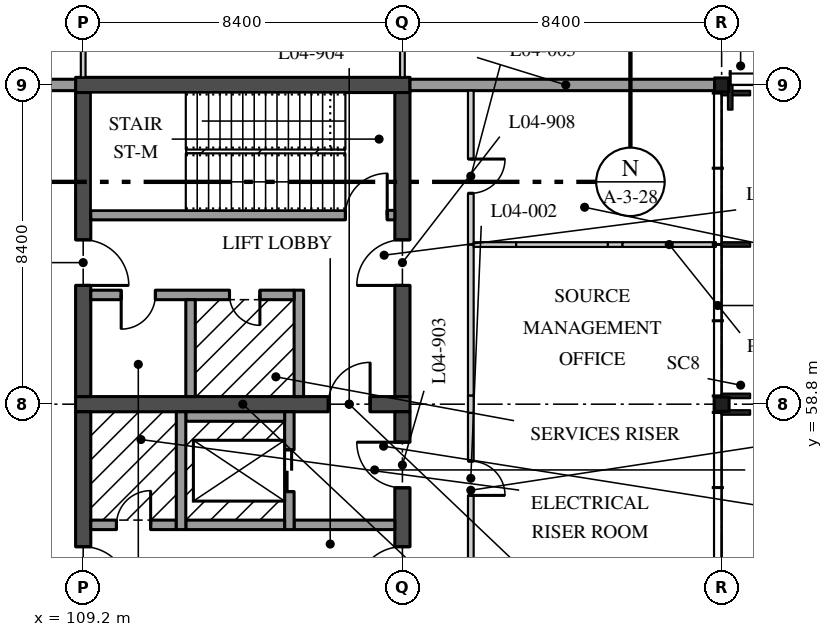
"""IFC4 building model, lengths in metres.
Left out: names, types, materials, properties, quantities, classifications, styles, units other than length and angle.
Written with IfcOpenShell. Run it as: python <this file> out.ifc"""

import sys

from ifc_helpers import new_model, si_unit, direction, frame, frame_2d, origin, origin_2d, place, context, subcontext, project, spatial, rectangle, i_section, extrude, element, fill, save


model = new_model("IFC4")
c1 = context("Model", 3, precision=1e-05, world=origin(), true_north=direction((0.0, 1.0)))
c2 = subcontext(c1, "Body", "Model", "MODEL_VIEW")
j1 = project(units=[si_unit("LENGTHUNIT", "METRE"), si_unit("PLANEANGLEUNIT", "RADIAN")], contexts=[c1])
p1 = place(None, origin())
s1 = spatial("IfcSite", under=j1, at=p1, CompositionType="ELEMENT")
p2 = place(p1, origin())
s2 = spatial("IfcBuilding", under=s1, at=p2, CompositionType="ELEMENT")
p3 = place(p2, frame((0.0, 0.0, 18.9)))
s3 = spatial("IfcBuildingStorey", under=s2, at=p3, CompositionType="ELEMENT", Elevation=18.9)
p4 = place(p3, frame((126.0, 58.8, 0.0), z_axis=(0.0, 0.0, 1.0), x_axis=(1.0, 0.0, 0.0)))
e1 = element("IfcColumn", 1, at=p4, inside=s3, PredefinedType="COLUMN", context=c2, shape_type="SweptSolid", body=[
    extrude(i_section(OverallWidth=0.394, OverallDepth=0.376, WebThickness=0.017, FlangeThickness=0.028, FilletRadius=0.015, at=origin_2d()), origin(), (0.0, 0.0, 1.0), 4.37),
])
p5 = place(p3, frame((126.0, 67.2, 0.0), z_axis=(0.0, 0.0, 1.0), x_axis=(1.0, 0.0, 0.0)))
e2 = element("IfcColumn", 2, at=p5, inside=s3, PredefinedType="COLUMN", context=c2, shape_type="SweptSolid", body=[
    extrude(i_section(OverallWidth=0.373, OverallDepth=0.368, WebThickness=0.015, FlangeThickness=0.024, FilletRadius=0.015, at=origin_2d()), origin(), (0.0, 0.0, 1.0), 4.37),
])
p6 = place(p3, frame((109.0, 58.8, 0.0), z_axis=(0.0, 0.0, 1.0), x_axis=(1.0, 0.0, 0.0)))
e3 = element("IfcWall", 3, at=p6, inside=s3, PredefinedType="SHEAR", context=c2, shape_type="SweptSolid", body=[
    extrude(rectangle(XDim=8.8, YDim=0.4, at=frame_2d((4.4, 0.0))), origin(), (0.0, 0.0, 1.0), 4.37),
])
p7 = place(p6, frame((6.65, 0.0, 0.0)))
e4 = element("IfcOpeningElement", 4, at=p7, cuts=e3, PredefinedType="OPENING", context=c2, shape_type="SweptSolid", body=[
    extrude(rectangle(XDim=1.1, YDim=2.1, at=frame_2d((0.55, 1.05))), frame((0.0, 0.21, 0.0), z_axis=(0.0, -1.0, 0.0), x_axis=(1.0, 0.0, 0.0)), (0.0, 0.0, 1.0), 0.42),
])
p8 = place(p3, frame((109.2, 50.6, 0.0), z_axis=(0.0, 0.0, 1.0), x_axis=(0.0, 1.0, 0.0)))
e5 = element("IfcWall", 5, at=p8, inside=s3, PredefinedType="SHEAR", context=c2, shape_type="SweptSolid", body=[
    extrude(rectangle(XDim=8.0, YDim=0.4, at=frame_2d((4.0, 0.0))), origin(), (0.0, 0.0, 1.0), 4.37),
])
p9 = place(p8, frame((3.25, 0.0, 0.0)))
e6 = element("IfcOpeningElement", 6, at=p9, cuts=e5, PredefinedType="OPENING", context=c2, shape_type="SweptSolid", body=[
    extrude(rectangle(XDim=1.2, YDim=2.1, at=frame_2d((0.6, 1.05))), frame((0.0, 0.21, 0.0), z_axis=(0.0, -1.0, 0.0), x_axis=(1.0, 0.0, 0.0)), (0.0, 0.0, 1.0), 0.42),
])
p10 = place(p3, frame((117.6, 50.6, 0.0), z_axis=(0.0, 0.0, 1.0), x_axis=(0.0, 1.0, 0.0)))
e7 = element("IfcWall", 7, at=p10, inside=s3, PredefinedType="SHEAR", context=c2, shape_type="SweptSolid", body=[
    extrude(rectangle(XDim=8.0, YDim=0.4, at=frame_2d((4.0, 0.0))), origin(), (0.0, 0.0, 1.0), 4.37),
])
p11 = place(p10, frame((3.25, 0.0, 0.0)))
e8 = element("IfcOpeningElement", 8, at=p11, cuts=e7, PredefinedType="OPENING", context=c2, shape_type="SweptSolid", body=[
    extrude(rectangle(XDim=1.2, YDim=2.1, at=frame_2d((0.6, 1.05))), frame((0.0, 0.21, 0.0), z_axis=(0.0, -1.0, 0.0), x_axis=(1.0, 0.0, 0.0)), (0.0, 0.0, 1.0), 0.42),
])
p12 = place(p10, frame((6.0, 0.0, 0.0)))
e9 = element("IfcOpeningElement", 9, at=p12, cuts=e7, PredefinedType="OPENING", context=c2, shape_type="SweptSolid", body=[
    extrude(rectangle(XDim=1.2, YDim=2.1, at=frame_2d((0.6, 1.05))), frame((0.0, 0.21, 0.0), z_axis=(0.0, -1.0, 0.0), x_axis=(1.0, 0.0, 0.0)), (0.0, 0.0, 1.0), 0.42),
])
p13 = place(p3, frame((109.4, 55.625, 0.0), z_axis=(0.0, 0.0, 1.0), x_axis=(1.0, 0.0, 0.0)))
e10 = element("IfcWall", 10, at=p13, inside=s3, PredefinedType="SOLIDWALL", context=c2, shape_type="SweptSolid", body=[
    extrude(rectangle(XDim=2.25, YDim=0.25, at=frame_2d((1.125, 0.0))), origin(), (0.0, 0.0, 1.0), 4.37),
])
p14 = place(p13, frame((0.675, 0.0, 0.0)))
e11 = element("IfcOpeningElement", 11, at=p14, cuts=e10, PredefinedType="OPENING", context=c2, shape_type="SweptSolid", body=[
    extrude(rectangle(XDim=0.9, YDim=2.1, at=frame_2d((0.45, 1.05))), frame((0.0, 0.135, 0.0), z_axis=(0.0, -1.0, 0.0), x_axis=(1.0, 0.0, 0.0)), (0.0, 0.0, 1.0), 0.27),
])
p15 = place(p3, frame((114.75, 55.625, 0.0), z_axis=(0.0, 0.0, 1.0), x_axis=(1.0, 0.0, 0.0)))
e12 = element("IfcWall", 12, at=p15, inside=s3, PredefinedType="SOLIDWALL", context=c2, shape_type="SweptSolid", body=[
    extrude(rectangle(XDim=2.65, YDim=0.25, at=frame_2d((1.325, 0.0))), origin(), (0.0, 0.0, 1.0), 4.37),
])
p16 = place(p3, frame((109.0, 67.2, 0.0), z_axis=(0.0, 0.0, 1.0), x_axis=(1.0, 0.0, 0.0)))
e13 = element("IfcWall", 13, at=p16, inside=s3, PredefinedType="SHEAR", context=c2, shape_type="SweptSolid", body=[
    extrude(rectangle(XDim=8.8, YDim=0.4, at=frame_2d((4.4, 0.0))), origin(), (0.0, 0.0, 1.0), 4.37),
])
p17 = place(p3, frame((109.2, 59.0, 0.0), z_axis=(0.0, 0.0, 1.0), x_axis=(0.0, 1.0, 0.0)))
e14 = element("IfcWall", 14, at=p17, inside=s3, PredefinedType="SHEAR", context=c2, shape_type="SweptSolid", body=[
    extrude(rectangle(XDim=8.0, YDim=0.4, at=frame_2d((4.0, 0.0))), origin(), (0.0, 0.0, 1.0), 4.37),
])
p18 = place(p17, frame((2.925, 0.0, 0.0)))
e15 = element("IfcOpeningElement", 15, at=p18, cuts=e14, PredefinedType="OPENING", context=c2, shape_type="SweptSolid", body=[
    extrude(rectangle(XDim=1.2, YDim=2.1, at=frame_2d((0.6, 1.05))), frame((0.0, 0.21, 0.0), z_axis=(0.0, -1.0, 0.0), x_axis=(1.0, 0.0, 0.0)), (0.0, 0.0, 1.0), 0.42),
])
p19 = place(p3, frame((117.6, 59.0, 0.0), z_axis=(0.0, 0.0, 1.0), x_axis=(0.0, 1.0, 0.0)))
e16 = element("IfcWall", 16, at=p19, inside=s3, PredefinedType="SHEAR", context=c2, shape_type="SweptSolid", body=[
    extrude(rectangle(XDim=8.0, YDim=0.4, at=frame_2d((4.0, 0.0))), origin(), (0.0, 0.0, 1.0), 4.37),
])
p20 = place(p19, frame((2.925, 0.0, 0.0)))
e17 = element("IfcOpeningElement", 17, at=p20, cuts=e16, PredefinedType="OPENING", context=c2, shape_type="SweptSolid", body=[
    extrude(rectangle(XDim=1.2, YDim=2.1, at=frame_2d((0.6, 1.05))), frame((0.0, 0.21, 0.0), z_axis=(0.0, -1.0, 0.0), x_axis=(1.0, 0.0, 0.0)), (0.0, 0.0, 1.0), 0.42),
])
p21 = place(p3, frame((117.4, 63.775, 0.0), z_axis=(0.0, 0.0, 1.0), x_axis=(-1.0, 0.0, 0.0)))
e18 = element("IfcWall", 18, at=p21, inside=s3, PredefinedType="SOLIDWALL", context=c2, shape_type="SweptSolid", body=[
    extrude(rectangle(XDim=8.0, YDim=0.25, at=frame_2d((4.0, 0.0))), origin(), (0.0, 0.0, 1.0), 4.37),
])
p22 = place(p21, frame((0.2, 0.0, 0.0)))
e19 = element("IfcOpeningElement", 19, at=p22, cuts=e18, PredefinedType="OPENING", context=c2, shape_type="SweptSolid", body=[
    extrude(rectangle(XDim=1.1, YDim=2.1, at=frame_2d((0.55, 1.05))), frame((0.0, 0.135, 0.0), z_axis=(0.0, -1.0, 0.0), x_axis=(1.0, 0.0, 0.0)), (0.0, 0.0, 1.0), 0.27),
])
p23 = place(p3, frame((114.875, 61.8, 0.0), z_axis=(0.0, 0.0, 1.0), x_axis=(0.0, -1.0, 0.0)))
e20 = element("IfcWall", 20, at=p23, inside=s3, PredefinedType="SOLIDWALL", context=c2, shape_type="SweptSolid", body=[
    extrude(rectangle(XDim=2.8, YDim=0.25, at=frame_2d((1.4, 0.0))), origin(), (0.0, 0.0, 1.0), 4.37),
])
p24 = place(p3, frame((114.75, 61.675, 0.0), z_axis=(0.0, 0.0, 1.0), x_axis=(-1.0, 0.0, 0.0)))
e21 = element("IfcWall", 21, at=p24, inside=s3, PredefinedType="SOLIDWALL", context=c2, shape_type="SweptSolid", body=[
    extrude(rectangle(XDim=5.35, YDim=0.25, at=frame_2d((2.675, 0.0))), origin(), (0.0, 0.0, 1.0), 4.37),
])
p25 = place(p24, frame((3.65, 0.0, 0.0)))
e22 = element("IfcOpeningElement", 22, at=p25, cuts=e21, PredefinedType="OPENING", context=c2, shape_type="SweptSolid", body=[
    extrude(rectangle(XDim=0.9, YDim=2.1, at=frame_2d((0.45, 1.05))), frame((0.0, 0.135, 0.0), z_axis=(0.0, -1.0, 0.0), x_axis=(1.0, 0.0, 0.0)), (0.0, 0.0, 1.0), 0.27),
])
p26 = place(p24, frame((0.9, 0.0, 0.0)))
e23 = element("IfcOpeningElement", 23, at=p26, cuts=e21, PredefinedType="OPENING", context=c2, shape_type="SweptSolid", body=[
    extrude(rectangle(XDim=0.8, YDim=2.1, at=frame_2d((0.4, 1.05))), frame((0.0, 0.135, 0.0), z_axis=(0.0, -1.0, 0.0), x_axis=(1.0, 0.0, 0.0)), (0.0, 0.0, 1.0), 0.27),
])
p27 = place(p3, frame((112.025, 61.55, 0.0), z_axis=(0.0, 0.0, 1.0), x_axis=(0.0, -1.0, 0.0)))
e24 = element("IfcWall", 24, at=p27, inside=s3, PredefinedType="SOLIDWALL", context=c2, shape_type="SweptSolid", body=[
    extrude(rectangle(XDim=2.55, YDim=0.25, at=frame_2d((1.275, 0.0))), origin(), (0.0, 0.0, 1.0), 4.37),
])
p28 = place(p3, frame((114.625, 55.5, 0.0), z_axis=(0.0, 0.0, 1.0), x_axis=(0.0, 1.0, 0.0)))
e25 = element("IfcWall", 25, at=p28, inside=s3, PredefinedType="SOLIDWALL", context=c2, shape_type="SweptSolid", body=[
    extrude(rectangle(XDim=3.1, YDim=0.25, at=frame_2d((1.55, 0.0))), origin(), (0.0, 0.0, 1.0), 4.37),
])
p29 = place(p28, frame((1.0, 0.0, 0.0)))
e26 = element("IfcOpeningElement", 26, at=p29, cuts=e25, PredefinedType="OPENING", context=c2, shape_type="SweptSolid", body=[
    extrude(rectangle(XDim=1.1, YDim=2.1, at=frame_2d((0.55, 1.05))), frame((0.0, 0.135, 0.0), z_axis=(0.0, -1.0, 0.0), x_axis=(1.0, 0.0, 0.0)), (0.0, 0.0, 1.0), 0.27),
])
for number, where, z_axis, x_axis in (
    (27, (111.9, 58.475, 0.0), (0.0, 0.0, 1.0), (1.0, 0.0, 0.0)),
    (28, (111.9, 55.625, 0.0), (0.0, 0.0, 1.0), (1.0, 0.0, 0.0)),
):
    element("IfcWall", number, at=place(p3, frame(where, z_axis=z_axis, x_axis=x_axis)), inside=s3, PredefinedType="SOLIDWALL", context=c2, shape_type="SweptSolid", body=[
        extrude(rectangle(XDim=2.6, YDim=0.25, at=frame_2d((1.3, 0.0))), origin(), (0.0, 0.0, 1.0), 4.37),
    ])
p30 = place(p3, frame((111.775, 55.5, 0.0), z_axis=(0.0, 0.0, 1.0), x_axis=(0.0, 1.0, 0.0)))
e29 = element("IfcWall", 29, at=p30, inside=s3, PredefinedType="SOLIDWALL", context=c2, shape_type="SweptSolid", body=[
    extrude(rectangle(XDim=3.1, YDim=0.25, at=frame_2d((1.55, 0.0))), origin(), (0.0, 0.0, 1.0), 4.37),
])
p31 = place(p3, frame((119.4, 50.86, 0.0), z_axis=(0.0, 0.0, 1.0), x_axis=(0.0, 1.0, 0.0)))
e30 = element("IfcWall", 30, at=p31, inside=s3, PredefinedType="PARTITIONING", context=c2, shape_type="SweptSolid", body=[
    extrude(rectangle(XDim=7.71, YDim=0.15, at=frame_2d((3.855, 0.0))), origin(), (0.0, 0.0, 1.0), 4.37),
])
p32 = place(p31, frame((5.54, 0.0, 0.0)))
e31 = element("IfcOpeningElement", 31, at=p32, cuts=e30, PredefinedType="OPENING", context=c2, shape_type="SweptSolid", body=[
    extrude(rectangle(XDim=0.9, YDim=2.1, at=frame_2d((0.45, 1.05))), frame((0.0, 0.085, 0.0), z_axis=(0.0, -1.0, 0.0), x_axis=(1.0, 0.0, 0.0)), (0.0, 0.0, 1.0), 0.17),
])
p33 = place(p3, frame((119.4, 58.57, 0.0), z_axis=(0.0, 0.0, 1.0), x_axis=(0.0, 1.0, 0.0)))
e32 = element("IfcWall", 32, at=p33, inside=s3, PredefinedType="PARTITIONING", context=c2, shape_type="SweptSolid", body=[
    extrude(rectangle(XDim=0.46, YDim=0.15, at=frame_2d((0.23, 0.0))), origin(), (0.0, 0.0, 1.0), 3.746),
])
p34 = place(p3, frame((119.4, 59.03, 0.0), z_axis=(0.0, 0.0, 1.0), x_axis=(0.0, 1.0, 0.0)))
e33 = element("IfcWall", 33, at=p34, inside=s3, PredefinedType="PARTITIONING", context=c2, shape_type="SweptSolid", body=[
    extrude(rectangle(XDim=3.97, YDim=0.15, at=frame_2d((1.985, 0.0))), origin(), (0.0, 0.0, 1.0), 4.37),
])
p35 = place(p3, frame((119.4, 63.0, 0.0), z_axis=(0.0, 0.0, 1.0), x_axis=(0.0, 1.0, 0.0)))
e34 = element("IfcWall", 34, at=p35, inside=s3, PredefinedType="PARTITIONING", context=c2, shape_type="SweptSolid", body=[
    extrude(rectangle(XDim=4.05, YDim=0.15, at=frame_2d((2.025, 0.0))), origin(), (0.0, 0.0, 1.0), 4.37),
])
p36 = place(p35, frame((1.35, 0.0, 0.0)))
e35 = element("IfcOpeningElement", 35, at=p36, cuts=e34, PredefinedType="OPENING", context=c2, shape_type="SweptSolid", body=[
    extrude(rectangle(XDim=0.9, YDim=2.1, at=frame_2d((0.45, 1.05))), frame((0.0, 0.085, 0.0), z_axis=(0.0, -1.0, 0.0), x_axis=(1.0, 0.0, 0.0)), (0.0, 0.0, 1.0), 0.17),
])
p37 = place(p3, frame((119.475, 63.0, 0.0), z_axis=(0.0, 0.0, 1.0), x_axis=(1.0, 0.0, 0.0)))
e36 = element("IfcWall", 36, at=p37, inside=s3, PredefinedType="PARTITIONING", context=c2, shape_type="SweptSolid", body=[
    extrude(rectangle(XDim=1.118, YDim=0.125, at=frame_2d((0.559, 0.0))), origin(), (0.0, 0.0, 1.0), 3.895),
])
p38 = place(p3, frame((120.593, 63.0, 0.0), z_axis=(0.0, 0.0, 1.0), x_axis=(1.0, 0.0, 0.0)))
e37 = element("IfcWall", 37, at=p38, inside=s3, PredefinedType="PARTITIONING", context=c2, shape_type="SweptSolid", body=[
    extrude(rectangle(XDim=2.415, YDim=0.125, at=frame_2d((1.208, 0.0))), origin(), (0.0, 0.0, 1.0), 4.37),
])
p39 = place(p3, frame((123.008, 63.0, 0.0), z_axis=(0.0, 0.0, 1.0), x_axis=(1.0, 0.0, 0.0)))
e38 = element("IfcWall", 38, at=p39, inside=s3, PredefinedType="PARTITIONING", context=c2, shape_type="SweptSolid", body=[
    extrude(rectangle(XDim=0.384, YDim=0.125, at=frame_2d((0.192, 0.0))), origin(), (0.0, 0.0, 1.0), 3.895),
])
p40 = place(p3, frame((123.392, 63.0, 0.0), z_axis=(0.0, 0.0, 1.0), x_axis=(1.0, 0.0, 0.0)))
e39 = element("IfcWall", 39, at=p40, inside=s3, PredefinedType="PARTITIONING", context=c2, shape_type="SweptSolid", body=[
    extrude(rectangle(XDim=2.458, YDim=0.125, at=frame_2d((1.229, 0.0))), origin(), (0.0, 0.0, 1.0), 4.37),
])
for number, where, z_axis, x_axis in (
    (40, (109.2, 67.4, 0.0), (0.0, 0.0, 1.0), (0.0, 1.0, 0.0)),
    (41, (117.6, 67.4, 0.0), (0.0, 0.0, 1.0), (0.0, 1.0, 0.0)),
):
    element("IfcWall", number, at=place(p3, frame(where, z_axis=z_axis, x_axis=x_axis)), inside=s3, PredefinedType="PARTITIONING", context=c2, shape_type="SweptSolid", body=[
        extrude(rectangle(XDim=6.625, YDim=0.125, at=frame_2d((3.312, 0.0))), origin(), (0.0, 0.0, 1.0), 3.819),
    ])
for number, where, z_axis, x_axis in (
    (42, (125.997, 67.2, 0.0), (0.0, 0.0, 1.0), (-1.0, 0.0, 0.0)),
    (43, (109.0, 67.2, 0.0), (0.0, 0.0, 1.0), (-1.0, 0.0, 0.0)),
):
    element("IfcWall", number, at=place(p3, frame(where, z_axis=z_axis, x_axis=x_axis)), inside=s3, PredefinedType="SOLIDWALL", context=c2, shape_type="SweptSolid", body=[
        extrude(rectangle(XDim=8.197, YDim=0.3, at=frame_2d((4.099, 0.0))), origin(), (0.0, 0.0, 1.0), 3.746),
    ])
p41 = place(p9, frame((1.2, 0.0, 0.0), z_axis=(0.0, 0.0, 1.0), x_axis=(-1.0, 0.0, 0.0)))
e44 = element("IfcDoor", 44, at=p41, inside=s3, OperationType="SINGLE_SWING_LEFT", PredefinedType="DOOR", context=c2, shape_type="SweptSolid", body=[
    extrude(rectangle(XDim=1.2, YDim=2.1, at=frame_2d((0.6, 1.05))), frame((0.0, 0.035, 0.0), z_axis=(0.0, -1.0, 0.0), x_axis=(1.0, 0.0, 0.0)), (0.0, 0.0, 1.0), 0.07),
])
fill(e6, e44)
p42 = place(p11, origin())
e45 = element("IfcDoor", 45, at=p42, inside=s3, OperationType="SINGLE_SWING_RIGHT", PredefinedType="DOOR", context=c2, shape_type="SweptSolid", body=[
    extrude(rectangle(XDim=1.2, YDim=2.1, at=frame_2d((0.6, 1.05))), frame((0.0, 0.035, 0.0), z_axis=(0.0, -1.0, 0.0), x_axis=(1.0, 0.0, 0.0)), (0.0, 0.0, 1.0), 0.07),
])
fill(e8, e45)
p43 = place(p12, origin())
e46 = element("IfcDoor", 46, at=p43, inside=s3, OperationType="SINGLE_SWING_LEFT", PredefinedType="DOOR", context=c2, shape_type="SweptSolid", body=[
    extrude(rectangle(XDim=1.2, YDim=2.1, at=frame_2d((0.6, 1.05))), frame((0.0, 0.035, 0.0), z_axis=(0.0, -1.0, 0.0), x_axis=(1.0, 0.0, 0.0)), (0.0, 0.0, 1.0), 0.07),
])
fill(e9, e46)
p44 = place(p7, origin())
e47 = element("IfcDoor", 47, at=p44, inside=s3, OperationType="SINGLE_SWING_LEFT", PredefinedType="DOOR", context=c2, shape_type="SweptSolid", body=[
    extrude(rectangle(XDim=1.1, YDim=2.1, at=frame_2d((0.55, 1.05))), frame((0.0, 0.035, 0.0), z_axis=(0.0, -1.0, 0.0), x_axis=(1.0, 0.0, 0.0)), (0.0, 0.0, 1.0), 0.07),
])
fill(e4, e47)
p45 = place(p14, origin())
e48 = element("IfcDoor", 48, at=p45, inside=s3, OperationType="SINGLE_SWING_LEFT", PredefinedType="DOOR", context=c2, shape_type="SweptSolid", body=[
    extrude(rectangle(XDim=0.9, YDim=2.1, at=frame_2d((0.45, 1.05))), frame((0.0, 0.05, 0.0), z_axis=(0.0, -1.0, 0.0), x_axis=(1.0, 0.0, 0.0)), (0.0, 0.0, 1.0), 0.1),
])
fill(e11, e48)
p46 = place(p25, origin())
e49 = element("IfcDoor", 49, at=p46, inside=s3, OperationType="SINGLE_SWING_LEFT", PredefinedType="DOOR", context=c2, shape_type="SweptSolid", body=[
    extrude(rectangle(XDim=0.9, YDim=2.1, at=frame_2d((0.45, 1.05))), frame((0.0, 0.035, 0.0), z_axis=(0.0, -1.0, 0.0), x_axis=(1.0, 0.0, 0.0)), (0.0, 0.0, 1.0), 0.07),
])
fill(e22, e49)
p47 = place(p18, frame((1.2, 0.0, 0.0), z_axis=(0.0, 0.0, 1.0), x_axis=(-1.0, 0.0, 0.0)))
e50 = element("IfcDoor", 50, at=p47, inside=s3, OperationType="SINGLE_SWING_LEFT", PredefinedType="DOOR", context=c2, shape_type="SweptSolid", body=[
    extrude(rectangle(XDim=1.2, YDim=2.1, at=frame_2d((0.6, 1.05))), frame((0.0, 0.035, 0.0), z_axis=(0.0, -1.0, 0.0), x_axis=(1.0, 0.0, 0.0)), (0.0, 0.0, 1.0), 0.07),
])
fill(e15, e50)
p48 = place(p20, origin())
e51 = element("IfcDoor", 51, at=p48, inside=s3, OperationType="SINGLE_SWING_RIGHT", PredefinedType="DOOR", context=c2, shape_type="SweptSolid", body=[
    extrude(rectangle(XDim=1.2, YDim=2.1, at=frame_2d((0.6, 1.05))), frame((0.0, 0.035, 0.0), z_axis=(0.0, -1.0, 0.0), x_axis=(1.0, 0.0, 0.0)), (0.0, 0.0, 1.0), 0.07),
])
fill(e17, e51)
p49 = place(p26, origin())
e52 = element("IfcDoor", 52, at=p49, inside=s3, OperationType="SINGLE_SWING_RIGHT", PredefinedType="DOOR", context=c2, shape_type="SweptSolid", body=[
    extrude(rectangle(XDim=0.8, YDim=2.1, at=frame_2d((0.4, 1.05))), frame((0.0, 0.035, 0.0), z_axis=(0.0, -1.0, 0.0), x_axis=(1.0, 0.0, 0.0)), (0.0, 0.0, 1.0), 0.07),
])
fill(e23, e52)
p50 = place(p22, frame((1.1, 0.0, 0.0), z_axis=(0.0, 0.0, 1.0), x_axis=(-1.0, 0.0, 0.0)))
e53 = element("IfcDoor", 53, at=p50, inside=s3, OperationType="SINGLE_SWING_LEFT", PredefinedType="DOOR", context=c2, shape_type="SweptSolid", body=[
    extrude(rectangle(XDim=1.1, YDim=2.1, at=frame_2d((0.55, 1.05))), frame((0.0, 0.035, 0.0), z_axis=(0.0, -1.0, 0.0), x_axis=(1.0, 0.0, 0.0)), (0.0, 0.0, 1.0), 0.07),
])
fill(e19, e53)
p51 = place(p29, origin())
e54 = element("IfcDoor", 54, at=p51, inside=s3, OperationType="DOUBLE_DOOR_SLIDING", PredefinedType="DOOR", context=c2, shape_type="SweptSolid", body=[
    extrude(rectangle(XDim=1.1, YDim=2.1, at=frame_2d((0.55, 1.05))), frame((0.0, 0.04, 0.0), z_axis=(0.0, -1.0, 0.0), x_axis=(1.0, 0.0, 0.0)), (0.0, 0.0, 1.0), 0.08),
])
fill(e26, e54)
p52 = place(p32, frame((0.9, 0.0, 0.0), z_axis=(0.0, 0.0, 1.0), x_axis=(-1.0, 0.0, 0.0)))
e55 = element("IfcDoor", 55, at=p52, inside=s3, OperationType="SINGLE_SWING_LEFT", PredefinedType="DOOR", context=c2, shape_type="SweptSolid", body=[
    extrude(rectangle(XDim=0.9, YDim=2.1, at=frame_2d((0.45, 1.05))), frame((0.0, 0.025, 0.0), z_axis=(0.0, -1.0, 0.0), x_axis=(1.0, 0.0, 0.0)), (0.0, 0.0, 1.0), 0.05),
])
fill(e31, e55)
p53 = place(p36, frame((0.9, 0.0, 0.0), z_axis=(0.0, 0.0, 1.0), x_axis=(-1.0, 0.0, 0.0)))
e56 = element("IfcDoor", 56, at=p53, inside=s3, OperationType="SINGLE_SWING_RIGHT", PredefinedType="DOOR", context=c2, shape_type="SweptSolid", body=[
    extrude(rectangle(XDim=0.9, YDim=2.1, at=frame_2d((0.45, 1.05))), frame((0.0, 0.025, 0.0), z_axis=(0.0, -1.0, 0.0), x_axis=(1.0, 0.0, 0.0)), (0.0, 0.0, 1.0), 0.05),
])
fill(e35, e56)
save(model, sys.argv[1])
